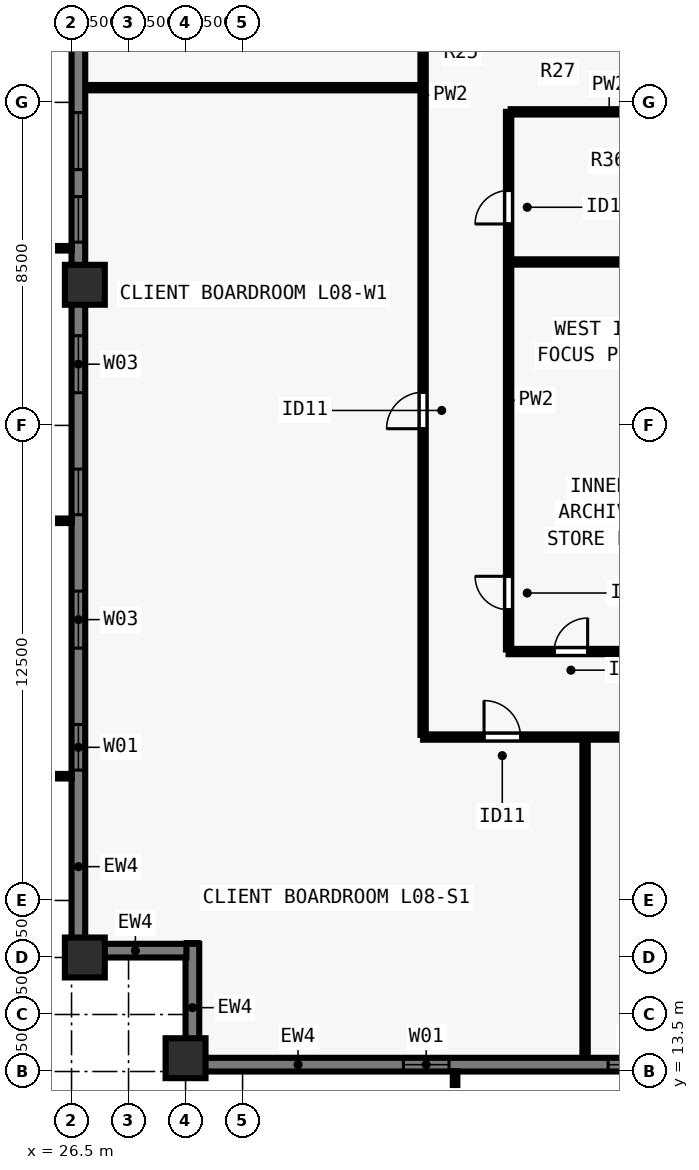
"""IFC4 building model, lengths in metres.
Left out: names, types, materials, properties, quantities, classifications, styles, units other than length and angle.
Written with IfcOpenShell. Run it as: python <this file> out.ifc"""

import sys

from ifc_helpers import new_model, si_unit, direction, frame, frame_2d, origin, origin_2d, place, context, subcontext, project, spatial, rectangle, extrude, element, fill, save


model = new_model("IFC4")
c1 = context("Model", 3, precision=1e-05, world=origin(), true_north=direction((0.0, 1.0)))
c2 = subcontext(c1, "Body", "Model", "MODEL_VIEW")
j1 = project(units=[si_unit("LENGTHUNIT", "METRE"), si_unit("PLANEANGLEUNIT", "RADIAN")], contexts=[c1])
p1 = place(None, origin())
s1 = spatial("IfcSite", under=j1, at=p1, CompositionType="ELEMENT")
p2 = place(p1, origin())
s2 = spatial("IfcBuilding", under=s1, at=p2, CompositionType="ELEMENT")
p3 = place(p2, frame((0.0, 0.0, 34.0)))
s3 = spatial("IfcBuildingStorey", under=s2, at=p3, CompositionType="ELEMENT", Elevation=34.0)
for number, where, z_axis, x_axis in (
    (1, (29.5, 13.85, 0.0), (0.0, 0.0, 1.0), (1.0, 0.0, 0.0)),
    (2, (26.85, 34.2, 0.0), (0.0, 0.0, 1.0), (0.0, 1.0, 0.0)),
    (3, (26.85, 16.5, 0.0), (0.0, 0.0, 1.0), (0.0, 1.0, 0.0)),
):
    element("IfcColumn", number, at=place(p3, frame(where, z_axis=z_axis, x_axis=x_axis)), inside=s3, PredefinedType="COLUMN", context=c2, shape_type="SweptSolid", body=[
        extrude(rectangle(XDim=1.05, YDim=1.05, at=origin_2d()), origin(), (0.0, 0.0, 1.0), 3.5),
    ])
p4 = place(p3, frame((47.8, 13.68, 0.0), z_axis=(0.0, 0.0, 1.0), x_axis=(-1.0, 0.0, 0.0)))
e4 = element("IfcWall", 4, at=p4, inside=s3, PredefinedType="SOLIDWALL", context=c2, shape_type="SweptSolid", body=[
    extrude(rectangle(XDim=17.962, YDim=0.36, at=frame_2d((8.981, 0.0))), origin(), (0.0, 0.0, 1.0), 3.28),
])
p5 = place(p4, frame((2.794, 0.0, 0.8)))
e5 = element("IfcOpeningElement", 5, at=p5, cuts=e4, PredefinedType="OPENING", context=c2, shape_type="SweptSolid", body=[
    extrude(rectangle(XDim=1.2, YDim=1.544, at=frame_2d((0.6, 0.772))), frame((0.0, 0.19, 0.0), z_axis=(0.0, -1.0, 0.0), x_axis=(1.0, 0.0, 0.0)), (0.0, 0.0, 1.0), 0.38),
])
p6 = place(p4, frame((5.681, 0.0, 0.8)))
e6 = element("IfcOpeningElement", 6, at=p6, cuts=e4, PredefinedType="OPENING", context=c2, shape_type="SweptSolid", body=[
    extrude(rectangle(XDim=1.5, YDim=1.544, at=frame_2d((0.75, 0.772))), frame((0.0, 0.19, 0.0), z_axis=(0.0, -1.0, 0.0), x_axis=(1.0, 0.0, 0.0)), (0.0, 0.0, 1.0), 0.38),
])
p7 = place(p4, frame((11.368, 0.0, 0.8)))
e7 = element("IfcOpeningElement", 7, at=p7, cuts=e4, PredefinedType="OPENING", context=c2, shape_type="SweptSolid", body=[
    extrude(rectangle(XDim=1.2, YDim=1.544, at=frame_2d((0.6, 0.772))), frame((0.0, 0.19, 0.0), z_axis=(0.0, -1.0, 0.0), x_axis=(1.0, 0.0, 0.0)), (0.0, 0.0, 1.0), 0.38),
])
p8 = place(p3, frame((29.68, 13.5, 0.0), z_axis=(0.0, 0.0, 1.0), x_axis=(0.0, 1.0, 0.0)))
e8 = element("IfcWall", 8, at=p8, inside=s3, PredefinedType="SOLIDWALL", context=c2, shape_type="SweptSolid", body=[
    extrude(rectangle(XDim=3.36, YDim=0.36, at=frame_2d((1.68, 0.0))), origin(), (0.0, 0.0, 1.0), 3.28),
])
p9 = place(p3, frame((29.522, 16.68, 0.0), z_axis=(0.0, 0.0, 1.0), x_axis=(-1.0, 0.0, 0.0)))
e9 = element("IfcWall", 9, at=p9, inside=s3, PredefinedType="SOLIDWALL", context=c2, shape_type="SweptSolid", body=[
    extrude(rectangle(XDim=2.684, YDim=0.36, at=frame_2d((1.342, 0.0))), origin(), (0.0, 0.0, 1.0), 3.28),
])
p10 = place(p3, frame((26.68, 16.5, 0.0), z_axis=(0.0, 0.0, 1.0), x_axis=(0.0, 1.0, 0.0)))
e10 = element("IfcWall", 10, at=p10, inside=s3, PredefinedType="SOLIDWALL", context=c2, shape_type="SweptSolid", body=[
    extrude(rectangle(XDim=44.662, YDim=0.36, at=frame_2d((22.331, 0.0))), origin(), (0.0, 0.0, 1.0), 3.28),
])
p11 = place(p10, frame((4.93, 0.0, 0.8)))
e11 = element("IfcOpeningElement", 11, at=p11, cuts=e10, PredefinedType="OPENING", context=c2, shape_type="SweptSolid", body=[
    extrude(rectangle(XDim=1.2, YDim=1.544, at=frame_2d((0.6, 0.772))), frame((0.0, 0.19, 0.0), z_axis=(0.0, -1.0, 0.0), x_axis=(1.0, 0.0, 0.0)), (0.0, 0.0, 1.0), 0.38),
])
p12 = place(p10, frame((8.14, 0.0, 0.8)))
e12 = element("IfcOpeningElement", 12, at=p12, cuts=e10, PredefinedType="OPENING", context=c2, shape_type="SweptSolid", body=[
    extrude(rectangle(XDim=1.5, YDim=1.544, at=frame_2d((0.75, 0.772))), frame((0.0, 0.19, 0.0), z_axis=(0.0, -1.0, 0.0), x_axis=(1.0, 0.0, 0.0)), (0.0, 0.0, 1.0), 0.38),
])
p13 = place(p10, frame((11.65, 0.0, 0.8)))
e13 = element("IfcOpeningElement", 13, at=p13, cuts=e10, PredefinedType="OPENING", context=c2, shape_type="SweptSolid", body=[
    extrude(rectangle(XDim=1.2, YDim=1.544, at=frame_2d((0.6, 0.772))), frame((0.0, 0.19, 0.0), z_axis=(0.0, -1.0, 0.0), x_axis=(1.0, 0.0, 0.0)), (0.0, 0.0, 1.0), 0.38),
])
p14 = place(p10, frame((14.861, 0.0, 0.8)))
e14 = element("IfcOpeningElement", 14, at=p14, cuts=e10, PredefinedType="OPENING", context=c2, shape_type="SweptSolid", body=[
    extrude(rectangle(XDim=1.5, YDim=1.544, at=frame_2d((0.75, 0.772))), frame((0.0, 0.19, 0.0), z_axis=(0.0, -1.0, 0.0), x_axis=(1.0, 0.0, 0.0)), (0.0, 0.0, 1.0), 0.38),
])
p15 = place(p10, frame((18.821, 0.0, 0.8)))
e15 = element("IfcOpeningElement", 15, at=p15, cuts=e10, PredefinedType="OPENING", context=c2, shape_type="SweptSolid", body=[
    extrude(rectangle(XDim=1.2, YDim=1.544, at=frame_2d((0.6, 0.772))), frame((0.0, 0.19, 0.0), z_axis=(0.0, -1.0, 0.0), x_axis=(1.0, 0.0, 0.0)), (0.0, 0.0, 1.0), 0.38),
])
p16 = place(p10, frame((20.731, 0.0, 0.8)))
e16 = element("IfcOpeningElement", 16, at=p16, cuts=e10, PredefinedType="OPENING", context=c2, shape_type="SweptSolid", body=[
    extrude(rectangle(XDim=1.5, YDim=1.544, at=frame_2d((0.75, 0.772))), frame((0.0, 0.19, 0.0), z_axis=(0.0, -1.0, 0.0), x_axis=(1.0, 0.0, 0.0)), (0.0, 0.0, 1.0), 0.38),
])
p17 = place(p10, frame((25.091, 0.0, 0.8)))
e17 = element("IfcOpeningElement", 17, at=p17, cuts=e10, PredefinedType="OPENING", context=c2, shape_type="SweptSolid", body=[
    extrude(rectangle(XDim=1.2, YDim=1.544, at=frame_2d((0.6, 0.772))), frame((0.0, 0.19, 0.0), z_axis=(0.0, -1.0, 0.0), x_axis=(1.0, 0.0, 0.0)), (0.0, 0.0, 1.0), 0.38),
])
p18 = place(p10, frame((28.302, 0.0, 0.8)))
e18 = element("IfcOpeningElement", 18, at=p18, cuts=e10, PredefinedType="OPENING", context=c2, shape_type="SweptSolid", body=[
    extrude(rectangle(XDim=1.5, YDim=1.544, at=frame_2d((0.75, 0.772))), frame((0.0, 0.19, 0.0), z_axis=(0.0, -1.0, 0.0), x_axis=(1.0, 0.0, 0.0)), (0.0, 0.0, 1.0), 0.38),
])
p19 = place(p10, frame((31.812, 0.0, 0.8)))
e19 = element("IfcOpeningElement", 19, at=p19, cuts=e10, PredefinedType="OPENING", context=c2, shape_type="SweptSolid", body=[
    extrude(rectangle(XDim=1.2, YDim=1.544, at=frame_2d((0.6, 0.772))), frame((0.0, 0.19, 0.0), z_axis=(0.0, -1.0, 0.0), x_axis=(1.0, 0.0, 0.0)), (0.0, 0.0, 1.0), 0.38),
])
p20 = place(p10, frame((35.022, 0.0, 0.8)))
e20 = element("IfcOpeningElement", 20, at=p20, cuts=e10, PredefinedType="OPENING", context=c2, shape_type="SweptSolid", body=[
    extrude(rectangle(XDim=1.5, YDim=1.544, at=frame_2d((0.75, 0.772))), frame((0.0, 0.19, 0.0), z_axis=(0.0, -1.0, 0.0), x_axis=(1.0, 0.0, 0.0)), (0.0, 0.0, 1.0), 0.38),
])
p21 = place(p10, frame((38.532, 0.0, 0.8)))
e21 = element("IfcOpeningElement", 21, at=p21, cuts=e10, PredefinedType="OPENING", context=c2, shape_type="SweptSolid", body=[
    extrude(rectangle(XDim=1.2, YDim=1.544, at=frame_2d((0.6, 0.772))), frame((0.0, 0.19, 0.0), z_axis=(0.0, -1.0, 0.0), x_axis=(1.0, 0.0, 0.0)), (0.0, 0.0, 1.0), 0.38),
])
p22 = place(p3, frame((35.75, 22.3, 0.0), z_axis=(0.0, 0.0, 1.0), x_axis=(1.0, 0.0, 0.0)))
e22 = element("IfcWall", 22, at=p22, inside=s3, PredefinedType="PARTITIONING", context=c2, shape_type="SweptSolid", body=[
    extrude(rectangle(XDim=32.5, YDim=0.14, at=frame_2d((16.25, 0.0))), origin(), (0.0, 0.0, 1.0), 3.28),
])
p23 = place(p22, frame((1.604, 0.0, 0.0)))
e23 = element("IfcOpeningElement", 23, at=p23, cuts=e22, PredefinedType="OPENING", context=c2, shape_type="SweptSolid", body=[
    extrude(rectangle(XDim=0.96, YDim=2.12, at=frame_2d((0.48, 1.06))), frame((0.0, 0.08, 0.0), z_axis=(0.0, -1.0, 0.0), x_axis=(1.0, 0.0, 0.0)), (0.0, 0.0, 1.0), 0.16),
])
p24 = place(p22, frame((9.585, 0.0, 0.0)))
e24 = element("IfcOpeningElement", 24, at=p24, cuts=e22, PredefinedType="OPENING", context=c2, shape_type="SweptSolid", body=[
    extrude(rectangle(XDim=0.96, YDim=2.12, at=frame_2d((0.48, 1.06))), frame((0.0, 0.08, 0.0), z_axis=(0.0, -1.0, 0.0), x_axis=(1.0, 0.0, 0.0)), (0.0, 0.0, 1.0), 0.16),
])
p25 = place(p22, frame((22.125, 0.0, 0.0)))
e25 = element("IfcOpeningElement", 25, at=p25, cuts=e22, PredefinedType="OPENING", context=c2, shape_type="SweptSolid", body=[
    extrude(rectangle(XDim=0.96, YDim=2.12, at=frame_2d((0.48, 1.06))), frame((0.0, 0.08, 0.0), z_axis=(0.0, -1.0, 0.0), x_axis=(1.0, 0.0, 0.0)), (0.0, 0.0, 1.0), 0.16),
])
p26 = place(p22, frame((31.18, 0.0, 0.0)))
e26 = element("IfcOpeningElement", 26, at=p26, cuts=e22, PredefinedType="OPENING", context=c2, shape_type="SweptSolid", body=[
    extrude(rectangle(XDim=0.96, YDim=2.12, at=frame_2d((0.48, 1.06))), frame((0.0, 0.08, 0.0), z_axis=(0.0, -1.0, 0.0), x_axis=(1.0, 0.0, 0.0)), (0.0, 0.0, 1.0), 0.16),
])
p27 = place(p3, frame((35.75, 22.355, 0.0), z_axis=(0.0, 0.0, 1.0), x_axis=(0.0, 1.0, 0.0)))
e27 = element("IfcWall", 27, at=p27, inside=s3, PredefinedType="PARTITIONING", context=c2, shape_type="SweptSolid", body=[
    extrude(rectangle(XDim=33.29, YDim=0.14, at=frame_2d((16.645, 0.0))), origin(), (0.0, 0.0, 1.0), 3.28),
])
p28 = place(p27, frame((8.058, 0.0, 0.0)))
e28 = element("IfcOpeningElement", 28, at=p28, cuts=e27, PredefinedType="OPENING", context=c2, shape_type="SweptSolid", body=[
    extrude(rectangle(XDim=0.96, YDim=2.12, at=frame_2d((0.48, 1.06))), frame((0.0, 0.08, 0.0), z_axis=(0.0, -1.0, 0.0), x_axis=(1.0, 0.0, 0.0)), (0.0, 0.0, 1.0), 0.16),
])
p29 = place(p27, frame((24.658, 0.0, 0.0)))
e29 = element("IfcOpeningElement", 29, at=p29, cuts=e27, PredefinedType="OPENING", context=c2, shape_type="SweptSolid", body=[
    extrude(rectangle(XDim=0.96, YDim=2.12, at=frame_2d((0.48, 1.06))), frame((0.0, 0.08, 0.0), z_axis=(0.0, -1.0, 0.0), x_axis=(1.0, 0.0, 0.0)), (0.0, 0.0, 1.0), 0.16),
])
p30 = place(p3, frame((38.0, 24.55, 0.0), z_axis=(0.0, 0.0, 1.0), x_axis=(1.0, 0.0, 0.0)))
e30 = element("IfcWall", 30, at=p30, inside=s3, PredefinedType="PARTITIONING", context=c2, shape_type="SweptSolid", body=[
    extrude(rectangle(XDim=28.0, YDim=0.14, at=frame_2d((14.0, 0.0))), origin(), (0.0, 0.0, 1.0), 3.28),
])
p31 = place(p30, frame((1.2, 0.0, 0.0)))
e31 = element("IfcOpeningElement", 31, at=p31, cuts=e30, PredefinedType="OPENING", context=c2, shape_type="SweptSolid", body=[
    extrude(rectangle(XDim=0.88, YDim=2.1, at=frame_2d((0.44, 1.05))), frame((0.0, 0.08, 0.0), z_axis=(0.0, -1.0, 0.0), x_axis=(1.0, 0.0, 0.0)), (0.0, 0.0, 1.0), 0.16),
])
p32 = place(p30, frame((10.5, 0.0, 0.0)))
e32 = element("IfcOpeningElement", 32, at=p32, cuts=e30, PredefinedType="OPENING", context=c2, shape_type="SweptSolid", body=[
    extrude(rectangle(XDim=0.88, YDim=2.1, at=frame_2d((0.44, 1.05))), frame((0.0, 0.08, 0.0), z_axis=(0.0, -1.0, 0.0), x_axis=(1.0, 0.0, 0.0)), (0.0, 0.0, 1.0), 0.16),
])
p33 = place(p30, frame((21.0, 0.0, 0.0)))
e33 = element("IfcOpeningElement", 33, at=p33, cuts=e30, PredefinedType="OPENING", context=c2, shape_type="SweptSolid", body=[
    extrude(rectangle(XDim=0.88, YDim=2.1, at=frame_2d((0.44, 1.05))), frame((0.0, 0.08, 0.0), z_axis=(0.0, -1.0, 0.0), x_axis=(1.0, 0.0, 0.0)), (0.0, 0.0, 1.0), 0.16),
])
p34 = place(p3, frame((38.0, 24.605, 0.0), z_axis=(0.0, 0.0, 1.0), x_axis=(0.0, 1.0, 0.0)))
e34 = element("IfcWall", 34, at=p34, inside=s3, PredefinedType="PARTITIONING", context=c2, shape_type="SweptSolid", body=[
    extrude(rectangle(XDim=14.145, YDim=0.14, at=frame_2d((7.073, 0.0))), origin(), (0.0, 0.0, 1.0), 3.28),
])
p35 = place(p34, frame((1.045, 0.0, 0.0)))
e35 = element("IfcOpeningElement", 35, at=p35, cuts=e34, PredefinedType="OPENING", context=c2, shape_type="SweptSolid", body=[
    extrude(rectangle(XDim=0.88, YDim=2.1, at=frame_2d((0.44, 1.05))), frame((0.0, 0.08, 0.0), z_axis=(0.0, -1.0, 0.0), x_axis=(1.0, 0.0, 0.0)), (0.0, 0.0, 1.0), 0.16),
])
p36 = place(p34, frame((11.195, 0.0, 0.0)))
e36 = element("IfcOpeningElement", 36, at=p36, cuts=e34, PredefinedType="OPENING", context=c2, shape_type="SweptSolid", body=[
    extrude(rectangle(XDim=0.88, YDim=2.1, at=frame_2d((0.44, 1.05))), frame((0.0, 0.08, 0.0), z_axis=(0.0, -1.0, 0.0), x_axis=(1.0, 0.0, 0.0)), (0.0, 0.0, 1.0), 0.16),
])
for number, where, z_axis, x_axis in (
    (37, (38.055, 38.75, 0.0), (0.0, 0.0, 1.0), (1.0, 0.0, 0.0)),
    (38, (38.055, 34.8, 0.0), (0.0, 0.0, 1.0), (1.0, 0.0, 0.0)),
):
    element("IfcWall", number, at=place(p3, frame(where, z_axis=z_axis, x_axis=x_axis)), inside=s3, PredefinedType="PARTITIONING", context=c2, shape_type="SweptSolid", body=[
        extrude(rectangle(XDim=5.185, YDim=0.14, at=frame_2d((2.593, 0.0))), origin(), (0.0, 0.0, 1.0), 3.28),
    ])
p37 = place(p3, frame((40.012, 13.92, 0.0), z_axis=(0.0, 0.0, 1.0), x_axis=(0.0, 1.0, 0.0)))
e39 = element("IfcWall", 39, at=p37, inside=s3, PredefinedType="PARTITIONING", context=c2, shape_type="SweptSolid", body=[
    extrude(rectangle(XDim=8.28, YDim=0.14, at=frame_2d((4.14, 0.0))), origin(), (0.0, 0.0, 1.0), 3.28),
])
p38 = place(p3, frame((26.92, 39.387, 0.0), z_axis=(0.0, 0.0, 1.0), x_axis=(1.0, 0.0, 0.0)))
e40 = element("IfcWall", 40, at=p38, inside=s3, PredefinedType="PARTITIONING", context=c2, shape_type="SweptSolid", body=[
    extrude(rectangle(XDim=8.73, YDim=0.14, at=frame_2d((4.365, 0.0))), origin(), (0.0, 0.0, 1.0), 2.849),
])
p39 = place(p6, origin())
e41 = element("IfcWindow", 41, at=p39, inside=s3, PartitioningType="SINGLE_PANEL", PredefinedType="WINDOW", context=c2, shape_type="SweptSolid", body=[
    extrude(rectangle(XDim=1.5, YDim=1.544, at=frame_2d((0.75, 0.772))), frame((0.0, -0.05, 0.0), z_axis=(0.0, -1.0, 0.0), x_axis=(1.0, 0.0, 0.0)), (0.0, 0.0, 1.0), 0.06),
])
fill(e6, e41)
p40 = place(p7, origin())
e42 = element("IfcWindow", 42, at=p40, inside=s3, PartitioningType="SINGLE_PANEL", PredefinedType="WINDOW", context=c2, shape_type="SweptSolid", body=[
    extrude(rectangle(XDim=1.2, YDim=1.544, at=frame_2d((0.6, 0.772))), frame((0.0, -0.05, 0.0), z_axis=(0.0, -1.0, 0.0), x_axis=(1.0, 0.0, 0.0)), (0.0, 0.0, 1.0), 0.06),
])
fill(e7, e42)
p41 = place(p11, origin())
e43 = element("IfcWindow", 43, at=p41, inside=s3, PartitioningType="SINGLE_PANEL", PredefinedType="WINDOW", context=c2, shape_type="SweptSolid", body=[
    extrude(rectangle(XDim=1.2, YDim=1.544, at=frame_2d((0.6, 0.772))), frame((0.0, -0.05, 0.0), z_axis=(0.0, -1.0, 0.0), x_axis=(1.0, 0.0, 0.0)), (0.0, 0.0, 1.0), 0.06),
])
fill(e11, e43)
p42 = place(p12, origin())
e44 = element("IfcWindow", 44, at=p42, inside=s3, PartitioningType="SINGLE_PANEL", PredefinedType="WINDOW", context=c2, shape_type="SweptSolid", body=[
    extrude(rectangle(XDim=1.5, YDim=1.544, at=frame_2d((0.75, 0.772))), frame((0.0, -0.05, 0.0), z_axis=(0.0, -1.0, 0.0), x_axis=(1.0, 0.0, 0.0)), (0.0, 0.0, 1.0), 0.06),
])
fill(e12, e44)
p43 = place(p13, origin())
e45 = element("IfcWindow", 45, at=p43, inside=s3, PartitioningType="SINGLE_PANEL", PredefinedType="WINDOW", context=c2, shape_type="SweptSolid", body=[
    extrude(rectangle(XDim=1.2, YDim=1.544, at=frame_2d((0.6, 0.772))), frame((0.0, -0.05, 0.0), z_axis=(0.0, -1.0, 0.0), x_axis=(1.0, 0.0, 0.0)), (0.0, 0.0, 1.0), 0.06),
])
fill(e13, e45)
p44 = place(p14, origin())
e46 = element("IfcWindow", 46, at=p44, inside=s3, PartitioningType="SINGLE_PANEL", PredefinedType="WINDOW", context=c2, shape_type="SweptSolid", body=[
    extrude(rectangle(XDim=1.5, YDim=1.544, at=frame_2d((0.75, 0.772))), frame((0.0, -0.05, 0.0), z_axis=(0.0, -1.0, 0.0), x_axis=(1.0, 0.0, 0.0)), (0.0, 0.0, 1.0), 0.06),
])
fill(e14, e46)
p45 = place(p15, origin())
e47 = element("IfcWindow", 47, at=p45, inside=s3, PartitioningType="SINGLE_PANEL", PredefinedType="WINDOW", context=c2, shape_type="SweptSolid", body=[
    extrude(rectangle(XDim=1.2, YDim=1.544, at=frame_2d((0.6, 0.772))), frame((0.0, -0.05, 0.0), z_axis=(0.0, -1.0, 0.0), x_axis=(1.0, 0.0, 0.0)), (0.0, 0.0, 1.0), 0.06),
])
fill(e15, e47)
p46 = place(p16, origin())
e48 = element("IfcWindow", 48, at=p46, inside=s3, PartitioningType="SINGLE_PANEL", PredefinedType="WINDOW", context=c2, shape_type="SweptSolid", body=[
    extrude(rectangle(XDim=1.5, YDim=1.544, at=frame_2d((0.75, 0.772))), frame((0.0, -0.05, 0.0), z_axis=(0.0, -1.0, 0.0), x_axis=(1.0, 0.0, 0.0)), (0.0, 0.0, 1.0), 0.06),
])
fill(e16, e48)
p47 = place(p31, origin())
e49 = element("IfcDoor", 49, at=p47, inside=s3, OperationType="SINGLE_SWING_RIGHT", PredefinedType="DOOR", context=c2, shape_type="SweptSolid", body=[
    extrude(rectangle(XDim=0.88, YDim=2.1, at=frame_2d((0.44, 1.05))), frame((0.0, 0.025, 0.0), z_axis=(0.0, -1.0, 0.0), x_axis=(1.0, 0.0, 0.0)), (0.0, 0.0, 1.0), 0.05),
])
fill(e31, e49)
p48 = place(p35, origin())
e50 = element("IfcDoor", 50, at=p48, inside=s3, OperationType="SINGLE_SWING_RIGHT", PredefinedType="DOOR", context=c2, shape_type="SweptSolid", body=[
    extrude(rectangle(XDim=0.88, YDim=2.1, at=frame_2d((0.44, 1.05))), frame((0.0, 0.025, 0.0), z_axis=(0.0, -1.0, 0.0), x_axis=(1.0, 0.0, 0.0)), (0.0, 0.0, 1.0), 0.05),
])
fill(e35, e50)
p49 = place(p36, origin())
e51 = element("IfcDoor", 51, at=p49, inside=s3, OperationType="SINGLE_SWING_LEFT", PredefinedType="DOOR", context=c2, shape_type="SweptSolid", body=[
    extrude(rectangle(XDim=0.88, YDim=2.1, at=frame_2d((0.44, 1.05))), frame((0.0, 0.025, 0.0), z_axis=(0.0, -1.0, 0.0), x_axis=(1.0, 0.0, 0.0)), (0.0, 0.0, 1.0), 0.05),
])
fill(e36, e51)
p50 = place(p23, origin())
e52 = element("IfcDoor", 52, at=p50, inside=s3, OperationType="SINGLE_SWING_LEFT", PredefinedType="DOOR", context=c2, shape_type="SweptSolid", body=[
    extrude(rectangle(XDim=0.96, YDim=2.12, at=frame_2d((0.48, 1.06))), frame((0.0, 0.025, 0.0), z_axis=(0.0, -1.0, 0.0), x_axis=(1.0, 0.0, 0.0)), (0.0, 0.0, 1.0), 0.05),
])
fill(e23, e52)
p51 = place(p28, origin())
e53 = element("IfcDoor", 53, at=p51, inside=s3, OperationType="SINGLE_SWING_LEFT", PredefinedType="DOOR", context=c2, shape_type="SweptSolid", body=[
    extrude(rectangle(XDim=0.96, YDim=2.12, at=frame_2d((0.48, 1.06))), frame((0.0, 0.025, 0.0), z_axis=(0.0, -1.0, 0.0), x_axis=(1.0, 0.0, 0.0)), (0.0, 0.0, 1.0), 0.05),
])
fill(e28, e53)
save(model, sys.argv[1])
